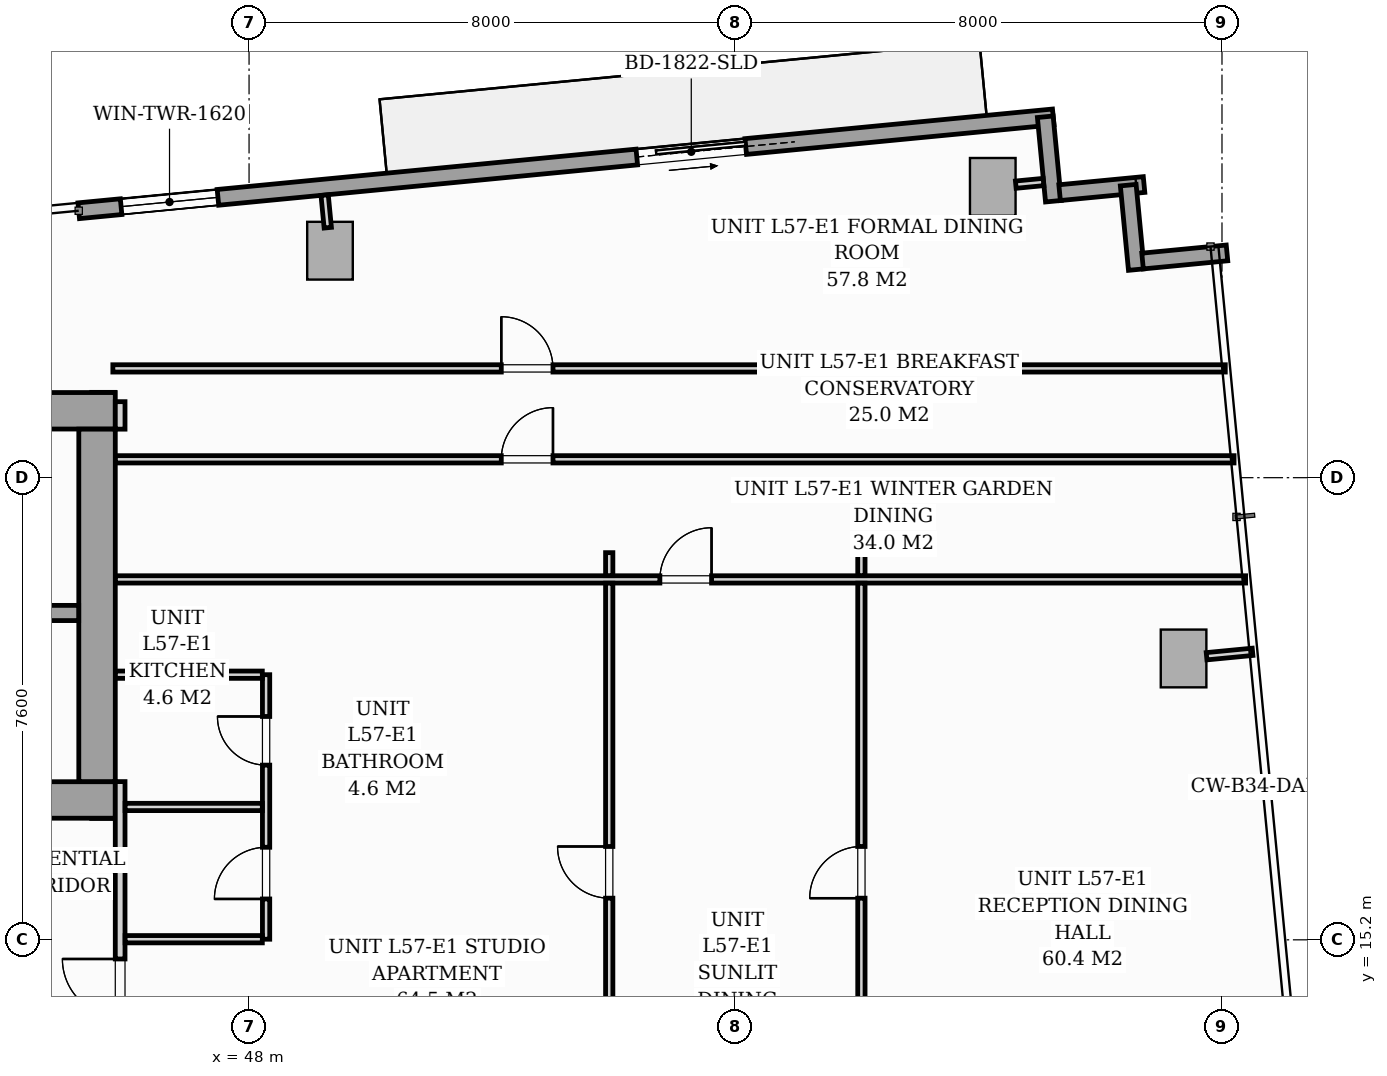
"""IFC4 building model, lengths in metres.
Left out: names, types, materials, properties, quantities, classifications, styles, units other than length and angle.
Written with IfcOpenShell. Run it as: python <this file> out.ifc"""

import sys

from ifc_helpers import new_model, si_unit, direction, frame, frame_2d, origin, origin_2d, place, context, subcontext, project, spatial, rectangle, i_section, extrude, source, transform, mapped, element, fill, save


model = new_model("IFC4")
c1 = context("Model", 3, precision=1e-05, world=origin(), true_north=direction((0.0, 1.0)))
c2 = subcontext(c1, "Body", "Model", "MODEL_VIEW")
j1 = project(units=[si_unit("LENGTHUNIT", "METRE"), si_unit("PLANEANGLEUNIT", "RADIAN")], contexts=[c1])
p1 = place(None, origin())
s1 = spatial("IfcSite", under=j1, at=p1, CompositionType="ELEMENT")
p2 = place(p1, origin())
s2 = spatial("IfcBuilding", under=s1, at=p2, CompositionType="ELEMENT")
p3 = place(p2, frame((0.0, 0.0, 198.6)))
s3 = spatial("IfcBuildingStorey", under=s2, at=p3, CompositionType="ELEMENT", Elevation=198.6)
m1 = source(origin(), c2, "Body", "SweptSolid", [
    extrude(i_section(OverallWidth=0.416, OverallDepth=0.446, WebThickness=0.039, FlangeThickness=0.063, FilletRadius=0.018, at=origin_2d()), origin(), (0.0, 0.0, 1.0), 3.196),
])
for number, where, z_axis, x_axis in (
    (1, (45.6, 17.4, 0.002), (0.0, 0.0, 1.0), (1.0, 0.0, 0.0)),
    (2, (45.6, 24.0, 0.002), (0.0, 0.0, 1.0), (1.0, 0.0, 0.0)),
):
    element("IfcColumn", number, at=place(p3, frame(where, z_axis=z_axis, x_axis=x_axis)), inside=s3, PredefinedType="PILASTER", context=c2, shape_type="MappedRepresentation", body=[
        mapped(m1, transform((0.0, 0.0, 0.0), scale=1.0)),
    ])
m2 = source(origin(), c2, "Body", "SweptSolid", [
    extrude(rectangle(XDim=0.75, YDim=0.95, at=origin_2d()), origin(), (0.0, 0.0, 1.0), 3.196),
])
for number, where, z_axis, x_axis in (
    (3, (49.331, 26.533, 0.002), (0.0, 0.0, 1.0), (0.995, 0.096, 0.0)),
    (4, (60.23, 27.582, 0.002), (0.0, 0.0, 1.0), (0.995, 0.096, 0.0)),
    (5, (63.368, 19.827, 0.002), (0.0, 0.0, 1.0), (0.995, 0.096, 0.0)),
):
    element("IfcColumn", number, at=place(p3, frame(where, z_axis=z_axis, x_axis=x_axis)), inside=s3, PredefinedType="COLUMN", context=c2, shape_type="MappedRepresentation", body=[
        mapped(m2, transform((0.0, 0.0, 0.0), scale=1.0)),
    ])
p4 = place(p3, frame((45.199, 27.19, 0.0), z_axis=(0.0, 0.0, 1.0), x_axis=(0.995397074604, 0.095836652014, 0.0)))
e6 = element("IfcWall", 6, at=p4, inside=s3, PredefinedType="STANDARD", context=c2, shape_type="SweptSolid", body=[
    extrude(rectangle(XDim=16.1, YDim=0.26, at=frame_2d((8.05, 0.0))), origin(), (0.0, 0.0, 1.0), 2.94),
])
p5 = place(p4, frame((9.22, 0.0, 0.0)))
e7 = element("IfcOpeningElement", 7, at=p5, cuts=e6, PredefinedType="OPENING", context=c2, shape_type="SweptSolid", body=[
    extrude(rectangle(XDim=1.8, YDim=2.06, at=frame_2d((0.9, 1.03))), frame((0.0, 0.14, 0.0), z_axis=(0.0, -1.0, 0.0), x_axis=(1.0, 0.0, 0.0)), (0.0, 0.0, 1.0), 0.28),
])
p6 = place(p4, frame((0.7, 0.0, 0.65)))
e8 = element("IfcOpeningElement", 8, at=p6, cuts=e6, PredefinedType="OPENING", context=c2, shape_type="SweptSolid", body=[
    extrude(rectangle(XDim=1.6, YDim=1.5, at=frame_2d((0.8, 0.75))), frame((0.0, 0.14, 0.0), z_axis=(0.0, -1.0, 0.0), x_axis=(1.0, 0.0, 0.0)), (0.0, 0.0, 1.0), 0.28),
])
p7 = place(p3, frame((61.094, 28.735, 0.0), z_axis=(0.0, 0.0, 1.0), x_axis=(0.095742423056, -0.99540614245, 0.0)))
e9 = element("IfcWall", 9, at=p7, inside=s3, PredefinedType="STANDARD", context=c2, shape_type="SweptSolid", body=[
    extrude(rectangle(XDim=1.395, YDim=0.26, at=frame_2d((0.697, 0.0))), origin(), (0.0, 0.0, 1.0), 2.94),
])
p8 = place(p3, frame((61.33, 27.487, 0.0), z_axis=(0.0, 0.0, 1.0), x_axis=(0.995391056452, 0.09589913835, 0.0)))
e10 = element("IfcWall", 10, at=p8, inside=s3, PredefinedType="STANDARD", context=c2, shape_type="SweptSolid", body=[
    extrude(rectangle(XDim=1.395, YDim=0.26, at=frame_2d((0.698, 0.0))), origin(), (0.0, 0.0, 1.0), 2.94),
])
for number, where, z_axis, x_axis in (
    (11, (62.458, 27.611, 0.0), (0.0, 0.0, 1.0), (0.096, -0.995, 0.0)),
    (12, (62.694, 26.363, 0.0), (0.0, 0.0, 1.0), (0.995, 0.096, 0.0)),
):
    element("IfcWall", number, at=place(p3, frame(where, z_axis=z_axis, x_axis=x_axis)), inside=s3, PredefinedType="STANDARD", context=c2, shape_type="SweptSolid", body=[
        extrude(rectangle(XDim=1.395, YDim=0.26, at=frame_2d((0.697, 0.0))), origin(), (0.0, 0.0, 1.0), 2.94),
    ])
p9 = place(p3, frame((26.2, 17.5, 0.0), z_axis=(0.0, 0.0, 1.0), x_axis=(1.0, 0.0, 0.0)))
e13 = element("IfcWall", 13, at=p9, inside=s3, PredefinedType="SHEAR", context=c2, shape_type="SweptSolid", body=[
    extrude(rectangle(XDim=19.6, YDim=0.6, at=frame_2d((9.8, 0.0))), origin(), (0.0, 0.0, 1.0), 3.2),
])
p10 = place(p9, frame((0.95, 0.0, 0.0)))
e14 = element("IfcOpeningElement", 14, at=p10, cuts=e13, PredefinedType="OPENING", context=c2, shape_type="SweptSolid", body=[
    extrude(rectangle(XDim=0.95, YDim=2.06, at=frame_2d((0.475, 1.03))), frame((0.0, 0.31, 0.0), z_axis=(0.0, -1.0, 0.0), x_axis=(1.0, 0.0, 0.0)), (0.0, 0.0, 1.0), 0.62),
])
p11 = place(p9, frame((9.38, 0.0, 0.0)))
e15 = element("IfcOpeningElement", 15, at=p11, cuts=e13, PredefinedType="OPENING", context=c2, shape_type="SweptSolid", body=[
    extrude(rectangle(XDim=0.85, YDim=2.0, at=frame_2d((0.425, 1.0))), frame((0.0, 0.31, 0.0), z_axis=(0.0, -1.0, 0.0), x_axis=(1.0, 0.0, 0.0)), (0.0, 0.0, 1.0), 0.62),
])
p12 = place(p9, frame((17.55, 0.0, 0.0)))
e16 = element("IfcOpeningElement", 16, at=p12, cuts=e13, PredefinedType="OPENING", context=c2, shape_type="SweptSolid", body=[
    extrude(rectangle(XDim=0.95, YDim=2.06, at=frame_2d((0.475, 1.03))), frame((0.0, 0.31, 0.0), z_axis=(0.0, -1.0, 0.0), x_axis=(1.0, 0.0, 0.0)), (0.0, 0.0, 1.0), 0.62),
])
p13 = place(p3, frame((26.2, 23.9, 0.0), z_axis=(0.0, 0.0, 1.0), x_axis=(1.0, 0.0, 0.0)))
e17 = element("IfcWall", 17, at=p13, inside=s3, PredefinedType="SHEAR", context=c2, shape_type="SweptSolid", body=[
    extrude(rectangle(XDim=19.6, YDim=0.6, at=frame_2d((9.8, 0.0))), origin(), (0.0, 0.0, 1.0), 3.2),
])
p14 = place(p3, frame((45.5, 17.802, 0.0), z_axis=(0.0, 0.0, 1.0), x_axis=(0.0, 1.0, 0.0)))
e18 = element("IfcWall", 18, at=p14, inside=s3, PredefinedType="SHEAR", context=c2, shape_type="SweptSolid", body=[
    extrude(rectangle(XDim=5.796, YDim=0.6, at=frame_2d((2.898, 0.0))), origin(), (0.0, 0.0, 1.0), 3.2),
])
p15 = place(p3, frame((37.05, 20.575, 0.0), z_axis=(0.0, 0.0, 1.0), x_axis=(1.0, 0.0, 0.0)))
e19 = element("IfcWall", 19, at=p15, inside=s3, PredefinedType="SOLIDWALL", context=c2, shape_type="SweptSolid", body=[
    extrude(rectangle(XDim=8.148, YDim=0.25, at=frame_2d((4.074, 0.0))), origin(), (0.0, 0.0, 1.0), 3.2),
])
p16 = place(p15, frame((6.6, 0.0, 0.0)))
e20 = element("IfcOpeningElement", 20, at=p16, cuts=e19, PredefinedType="OPENING", context=c2, shape_type="SweptSolid", body=[
    extrude(rectangle(XDim=0.95, YDim=2.06, at=frame_2d((0.475, 1.03))), frame((0.0, 0.135, 0.0), z_axis=(0.0, -1.0, 0.0), x_axis=(1.0, 0.0, 0.0)), (0.0, 0.0, 1.0), 0.27),
])
p17 = place(p3, frame((45.88, 13.442, 0.0), z_axis=(0.0, 0.0, 1.0), x_axis=(0.0, 1.0, 0.0)))
e21 = element("IfcWall", 21, at=p17, inside=s3, PredefinedType="PARTITIONING", context=c2, shape_type="SweptSolid", body=[
    extrude(rectangle(XDim=4.36, YDim=0.16, at=frame_2d((2.18, 0.0))), origin(), (0.0, 0.0, 1.0), 2.94),
])
p18 = place(p17, frame((0.493, 0.0, 0.0)))
e22 = element("IfcOpeningElement", 22, at=p18, cuts=e21, PredefinedType="OPENING", context=c2, shape_type="SweptSolid", body=[
    extrude(rectangle(XDim=0.95, YDim=2.06, at=frame_2d((0.475, 1.03))), frame((0.0, 0.09, 0.0), z_axis=(0.0, -1.0, 0.0), x_axis=(1.0, 0.0, 0.0)), (0.0, 0.0, 1.0), 0.18),
])
p19 = place(p3, frame((45.88, 23.598, 0.0), z_axis=(0.0, 0.0, 1.0), x_axis=(0.0, 1.0, 0.0)))
e23 = element("IfcWall", 23, at=p19, inside=s3, PredefinedType="PARTITIONING", context=c2, shape_type="SweptSolid", body=[
    extrude(rectangle(XDim=0.452, YDim=0.16, at=frame_2d((0.226, 0.0))), origin(), (0.0, 0.0, 1.0), 2.94),
])
p20 = place(p3, frame((48.28, 15.21, 0.0), z_axis=(0.0, 0.0, 1.0), x_axis=(0.0, 1.0, 0.0)))
e24 = element("IfcWall", 24, at=p20, inside=s3, PredefinedType="PARTITIONING", context=c2, shape_type="SweptSolid", body=[
    extrude(rectangle(XDim=4.35, YDim=0.12, at=frame_2d((2.175, 0.0))), origin(), (0.0, 0.0, 1.0), 2.94),
])
p21 = place(p20, frame((0.662, 0.0, 0.0)))
e25 = element("IfcOpeningElement", 25, at=p21, cuts=e24, PredefinedType="OPENING", context=c2, shape_type="SweptSolid", body=[
    extrude(rectangle(XDim=0.85, YDim=2.05, at=frame_2d((0.425, 1.025))), frame((0.0, 0.07, 0.0), z_axis=(0.0, -1.0, 0.0), x_axis=(1.0, 0.0, 0.0)), (0.0, 0.0, 1.0), 0.14),
])
p22 = place(p20, frame((2.863, 0.0, 0.0)))
e26 = element("IfcOpeningElement", 26, at=p22, cuts=e24, PredefinedType="OPENING", context=c2, shape_type="SweptSolid", body=[
    extrude(rectangle(XDim=0.8, YDim=2.02, at=frame_2d((0.4, 1.01))), frame((0.0, 0.07, 0.0), z_axis=(0.0, -1.0, 0.0), x_axis=(1.0, 0.0, 0.0)), (0.0, 0.0, 1.0), 0.14),
])
p23 = place(p3, frame((45.962, 17.385, 0.0), z_axis=(0.0, 0.0, 1.0), x_axis=(1.0, 0.0, 0.0)))
e27 = element("IfcWall", 27, at=p23, inside=s3, PredefinedType="PARTITIONING", context=c2, shape_type="SweptSolid", body=[
    extrude(rectangle(XDim=2.256, YDim=0.12, at=frame_2d((1.128, 0.0))), origin(), (0.0, 0.0, 1.0), 2.281),
])
p24 = place(p3, frame((45.962, 15.21, 0.0), z_axis=(0.0, 0.0, 1.0), x_axis=(1.0, 0.0, 0.0)))
e28 = element("IfcWall", 28, at=p24, inside=s3, PredefinedType="PARTITIONING", context=c2, shape_type="SweptSolid", body=[
    extrude(rectangle(XDim=2.256, YDim=0.12, at=frame_2d((1.128, 0.0))), origin(), (0.0, 0.0, 1.0), 2.94),
])
p25 = place(p3, frame((45.802, 19.56, 0.0), z_axis=(0.0, 0.0, 1.0), x_axis=(1.0, 0.0, 0.0)))
e29 = element("IfcWall", 29, at=p25, inside=s3, PredefinedType="PARTITIONING", context=c2, shape_type="SweptSolid", body=[
    extrude(rectangle(XDim=2.416, YDim=0.12, at=frame_2d((1.208, 0.0))), origin(), (0.0, 0.0, 1.0), 2.94),
])
p26 = place(p3, frame((45.76, 24.597, 0.0), z_axis=(0.0, 0.0, 1.0), x_axis=(1.0, 0.0, 0.0)))
e30 = element("IfcWall", 30, at=p26, inside=s3, PredefinedType="PARTITIONING", context=c2, shape_type="SweptSolid", body=[
    extrude(rectangle(XDim=18.294, YDim=0.12, at=frame_2d((9.147, 0.0))), origin(), (0.0, 0.0, 1.0), 2.94),
])
p27 = place(p26, frame((6.388, 0.0, 0.0)))
e31 = element("IfcOpeningElement", 31, at=p27, cuts=e30, PredefinedType="OPENING", context=c2, shape_type="SweptSolid", body=[
    extrude(rectangle(XDim=0.85, YDim=2.05, at=frame_2d((0.425, 1.025))), frame((0.0, 0.07, 0.0), z_axis=(0.0, -1.0, 0.0), x_axis=(1.0, 0.0, 0.0)), (0.0, 0.0, 1.0), 0.14),
])
p28 = place(p3, frame((45.802, 23.102, 0.0), z_axis=(0.0, 0.0, 1.0), x_axis=(1.0, 0.0, 0.0)))
e32 = element("IfcWall", 32, at=p28, inside=s3, PredefinedType="PARTITIONING", context=c2, shape_type="SweptSolid", body=[
    extrude(rectangle(XDim=18.396, YDim=0.12, at=frame_2d((9.198, 0.0))), origin(), (0.0, 0.0, 1.0), 2.94),
])
p29 = place(p28, frame((6.346, 0.0, 0.0)))
e33 = element("IfcOpeningElement", 33, at=p29, cuts=e32, PredefinedType="OPENING", context=c2, shape_type="SweptSolid", body=[
    extrude(rectangle(XDim=0.85, YDim=2.05, at=frame_2d((0.425, 1.025))), frame((0.0, 0.07, 0.0), z_axis=(0.0, -1.0, 0.0), x_axis=(1.0, 0.0, 0.0)), (0.0, 0.0, 1.0), 0.14),
])
p30 = place(p3, frame((45.802, 21.127, 0.0), z_axis=(0.0, 0.0, 1.0), x_axis=(1.0, 0.0, 0.0)))
e34 = element("IfcWall", 34, at=p30, inside=s3, PredefinedType="PARTITIONING", context=c2, shape_type="SweptSolid", body=[
    extrude(rectangle(XDim=18.586, YDim=0.12, at=frame_2d((9.293, 0.0))), origin(), (0.0, 0.0, 1.0), 2.94),
])
p31 = place(p30, frame((8.954, 0.0, 0.0)))
e35 = element("IfcOpeningElement", 35, at=p31, cuts=e34, PredefinedType="OPENING", context=c2, shape_type="SweptSolid", body=[
    extrude(rectangle(XDim=0.85, YDim=2.05, at=frame_2d((0.425, 1.025))), frame((0.0, 0.07, 0.0), z_axis=(0.0, -1.0, 0.0), x_axis=(1.0, 0.0, 0.0)), (0.0, 0.0, 1.0), 0.14),
])
p32 = place(p3, frame((58.07, 11.556, 0.0), z_axis=(0.0, 0.0, 1.0), x_axis=(0.0, 1.0, 0.0)))
e36 = element("IfcWall", 36, at=p32, inside=s3, PredefinedType="PARTITIONING", context=c2, shape_type="SweptSolid", body=[
    extrude(rectangle(XDim=9.509, YDim=0.12, at=frame_2d((4.754, 0.0))), origin(), (0.0, 0.0, 1.0), 2.94),
])
p33 = place(p32, frame((4.329, 0.0, 0.0)))
e37 = element("IfcOpeningElement", 37, at=p33, cuts=e36, PredefinedType="OPENING", context=c2, shape_type="SweptSolid", body=[
    extrude(rectangle(XDim=0.85, YDim=2.05, at=frame_2d((0.425, 1.025))), frame((0.0, 0.07, 0.0), z_axis=(0.0, -1.0, 0.0), x_axis=(1.0, 0.0, 0.0)), (0.0, 0.0, 1.0), 0.14),
])
p34 = place(p3, frame((58.07, 21.189, 0.0), z_axis=(0.0, 0.0, 1.0), x_axis=(0.0, 1.0, 0.0)))
e38 = element("IfcWall", 38, at=p34, inside=s3, PredefinedType="PARTITIONING", context=c2, shape_type="SweptSolid", body=[
    extrude(rectangle(XDim=0.378, YDim=0.12, at=frame_2d((0.189, 0.0))), origin(), (0.0, 0.0, 1.0), 2.94),
])
p35 = place(p3, frame((53.923, 11.556, 0.0), z_axis=(0.0, 0.0, 1.0), x_axis=(0.0, 1.0, 0.0)))
e39 = element("IfcWall", 39, at=p35, inside=s3, PredefinedType="PARTITIONING", context=c2, shape_type="SweptSolid", body=[
    extrude(rectangle(XDim=9.509, YDim=0.12, at=frame_2d((4.754, 0.0))), origin(), (0.0, 0.0, 1.0), 2.94),
])
p36 = place(p35, frame((4.329, 0.0, 0.0)))
e40 = element("IfcOpeningElement", 40, at=p36, cuts=e39, PredefinedType="OPENING", context=c2, shape_type="SweptSolid", body=[
    extrude(rectangle(XDim=0.85, YDim=2.05, at=frame_2d((0.425, 1.025))), frame((0.0, 0.07, 0.0), z_axis=(0.0, -1.0, 0.0), x_axis=(1.0, 0.0, 0.0)), (0.0, 0.0, 1.0), 0.14),
])
p37 = place(p3, frame((53.923, 21.189, 0.0), z_axis=(0.0, 0.0, 1.0), x_axis=(0.0, 1.0, 0.0)))
e41 = element("IfcWall", 41, at=p37, inside=s3, PredefinedType="PARTITIONING", context=c2, shape_type="SweptSolid", body=[
    extrude(rectangle(XDim=0.378, YDim=0.12, at=frame_2d((0.189, 0.0))), origin(), (0.0, 0.0, 1.0), 2.94),
])
p38 = place(p3, frame((49.294, 26.911, 0.0), z_axis=(0.0, 0.0, 1.0), x_axis=(-0.095772948675, 0.995403205893, 0.0)))
e42 = element("IfcWall", 42, at=p38, inside=s3, PredefinedType="PARTITIONING", context=c2, shape_type="SweptSolid", body=[
    extrude(rectangle(XDim=0.538, YDim=0.12, at=frame_2d((0.269, 0.0))), origin(), (0.0, 0.0, 1.0), 2.94),
])
p39 = place(p3, frame((60.609, 27.618, 0.0), z_axis=(0.0, 0.0, 1.0), x_axis=(0.995384576284, 0.09596637586, 0.0)))
e43 = element("IfcWall", 43, at=p39, inside=s3, PredefinedType="PARTITIONING", context=c2, shape_type="SweptSolid", body=[
    extrude(rectangle(XDim=0.458, YDim=0.12, at=frame_2d((0.229, 0.0))), origin(), (0.0, 0.0, 1.0), 2.94),
])
p40 = place(p3, frame((63.747, 19.864, 0.0), z_axis=(0.0, 0.0, 1.0), x_axis=(0.995405496295, 0.095749140702, 0.0)))
e44 = element("IfcWall", 44, at=p40, inside=s3, PredefinedType="PARTITIONING", context=c2, shape_type="SweptSolid", body=[
    extrude(rectangle(XDim=0.76, YDim=0.12, at=frame_2d((0.38, 0.0))), origin(), (0.0, 0.0, 1.0), 2.94),
])
m3 = source(origin(), c2, "Body", "SweptSolid", [
    extrude(rectangle(XDim=1.8, YDim=2.06, at=frame_2d((0.9, 1.03))), frame((0.0, 0.025, 0.0), z_axis=(0.0, -1.0, 0.0), x_axis=(1.0, 0.0, 0.0)), (0.0, 0.0, 1.0), 0.05),
])
p41 = place(p5, origin())
e45 = element("IfcDoor", 45, at=p41, inside=s3, OperationType="SLIDING_TO_RIGHT", PredefinedType="DOOR", context=c2, shape_type="MappedRepresentation", body=[
    mapped(m3, transform((0.0, 0.0, 0.0), scale=1.0)),
])
fill(e7, e45)
m4 = source(origin(), c2, "Body", "SweptSolid", [
    extrude(rectangle(XDim=1.6, YDim=1.5, at=frame_2d((0.8, 0.75))), frame((0.0, 0.03, 0.0), z_axis=(0.0, -1.0, 0.0), x_axis=(1.0, 0.0, 0.0)), (0.0, 0.0, 1.0), 0.06),
])
p42 = place(p6, origin())
e46 = element("IfcWindow", 46, at=p42, inside=s3, PartitioningType="SINGLE_PANEL", PredefinedType="WINDOW", context=c2, shape_type="MappedRepresentation", body=[
    mapped(m4, transform((0.0, 0.0, 0.0), scale=1.0)),
])
fill(e8, e46)
m5 = source(origin(), c2, "Body", "SweptSolid", [
    extrude(rectangle(XDim=0.95, YDim=2.06, at=frame_2d((0.475, 1.03))), frame((0.0, 0.025, 0.0), z_axis=(0.0, -1.0, 0.0), x_axis=(1.0, 0.0, 0.0)), (0.0, 0.0, 1.0), 0.05),
])
p43 = place(p18, origin())
e47 = element("IfcDoor", 47, at=p43, inside=s3, OperationType="SINGLE_SWING_RIGHT", PredefinedType="DOOR", context=c2, shape_type="MappedRepresentation", body=[
    mapped(m5, transform((0.0, 0.0, 0.0), scale=1.0)),
])
fill(e22, e47)
m6 = source(origin(), c2, "Body", "SweptSolid", [
    extrude(rectangle(XDim=0.85, YDim=2.05, at=frame_2d((0.425, 1.025))), frame((0.0, 0.025, 0.0), z_axis=(0.0, -1.0, 0.0), x_axis=(1.0, 0.0, 0.0)), (0.0, 0.0, 1.0), 0.05),
])
p44 = place(p21, origin())
e48 = element("IfcDoor", 48, at=p44, inside=s3, OperationType="SINGLE_SWING_LEFT", PredefinedType="DOOR", context=c2, shape_type="MappedRepresentation", body=[
    mapped(m6, transform((0.0, 0.0, 0.0), scale=1.0)),
])
fill(e25, e48)
m7 = source(origin(), c2, "Body", "SweptSolid", [
    extrude(rectangle(XDim=0.8, YDim=2.02, at=frame_2d((0.4, 1.01))), frame((0.0, 0.025, 0.0), z_axis=(0.0, -1.0, 0.0), x_axis=(1.0, 0.0, 0.0)), (0.0, 0.0, 1.0), 0.05),
])
p45 = place(p22, origin())
e49 = element("IfcDoor", 49, at=p45, inside=s3, OperationType="SINGLE_SWING_RIGHT", PredefinedType="DOOR", context=c2, shape_type="MappedRepresentation", body=[
    mapped(m7, transform((0.0, 0.0, 0.0), scale=1.0)),
])
fill(e26, e49)
p46 = place(p27, origin())
e50 = element("IfcDoor", 50, at=p46, inside=s3, OperationType="SINGLE_SWING_LEFT", PredefinedType="DOOR", context=c2, shape_type="MappedRepresentation", body=[
    mapped(m6, transform((0.0, 0.0, 0.0), scale=1.0)),
])
fill(e31, e50)
p47 = place(p29, origin())
e51 = element("IfcDoor", 51, at=p47, inside=s3, OperationType="SINGLE_SWING_RIGHT", PredefinedType="DOOR", context=c2, shape_type="MappedRepresentation", body=[
    mapped(m6, transform((0.0, 0.0, 0.0), scale=1.0)),
])
fill(e33, e51)
p48 = place(p31, origin())
e52 = element("IfcDoor", 52, at=p48, inside=s3, OperationType="SINGLE_SWING_RIGHT", PredefinedType="DOOR", context=c2, shape_type="MappedRepresentation", body=[
    mapped(m6, transform((0.0, 0.0, 0.0), scale=1.0)),
])
fill(e35, e52)
p49 = place(p33, origin())
e53 = element("IfcDoor", 53, at=p49, inside=s3, OperationType="SINGLE_SWING_LEFT", PredefinedType="DOOR", context=c2, shape_type="MappedRepresentation", body=[
    mapped(m6, transform((0.0, 0.0, 0.0), scale=1.0)),
])
fill(e37, e53)
p50 = place(p36, origin())
e54 = element("IfcDoor", 54, at=p50, inside=s3, OperationType="SINGLE_SWING_RIGHT", PredefinedType="DOOR", context=c2, shape_type="MappedRepresentation", body=[
    mapped(m6, transform((0.0, 0.0, 0.0), scale=1.0)),
])
fill(e40, e54)
save(model, sys.argv[1])
